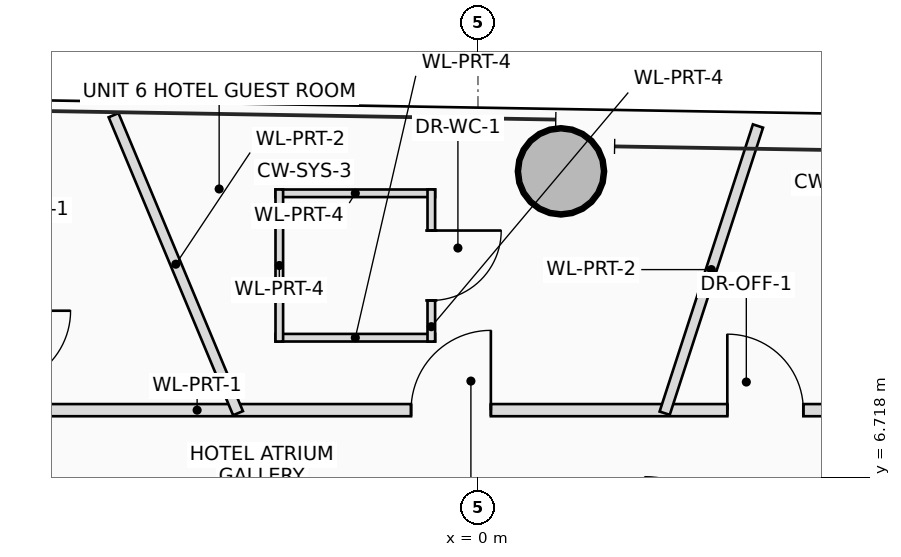
"""IFC4 building model, lengths in metres.
Left out: names, types, materials, properties, quantities, classifications, styles, units other than length and angle.
Written with IfcOpenShell. Run it as: python <this file> out.ifc"""

import sys

from ifc_helpers import new_model, si_unit, direction, frame, frame_2d, origin, origin_2d, place, context, subcontext, project, spatial, rectangle, hollow_circle, extrude, source, transform, mapped, element, fill, save


model = new_model("IFC4")
c1 = context("Model", 3, precision=1e-05, world=origin(), true_north=direction((0.0, 1.0)))
c2 = subcontext(c1, "Body", "Model", "MODEL_VIEW")
j1 = project(units=[si_unit("LENGTHUNIT", "METRE"), si_unit("PLANEANGLEUNIT", "RADIAN")], contexts=[c1])
p1 = place(None, origin())
s1 = spatial("IfcSite", under=j1, at=p1, CompositionType="ELEMENT")
p2 = place(p1, origin())
s2 = spatial("IfcBuilding", under=s1, at=p2, CompositionType="ELEMENT")
p3 = place(p2, frame((0.0, 0.0, 215.6)))
s3 = spatial("IfcBuildingStorey", under=s2, at=p3, CompositionType="ELEMENT", Elevation=215.6)
m1 = source(origin(), c2, "Body", "SweptSolid", [
    extrude(hollow_circle(Radius=0.575, WallThickness=0.042, at=origin_2d()), origin(), (0.0, 0.0, 1.0), 3.45),
])
p4 = place(p3, frame((1.092, 10.742, 0.0), z_axis=(0.0, 0.0, 1.0), x_axis=(1.0, 0.0, 0.0)))
e1 = element("IfcColumn", 1, at=p4, inside=s3, PredefinedType="COLUMN", context=c2, shape_type="MappedRepresentation", body=[
    mapped(m1, transform((0.0, 0.0, 0.0), scale=1.0)),
])
for number, where, z_axis, x_axis in (
    (2, (-2.664, 10.453, 0.0), (0.0, 0.0, 1.0), (1.0, 0.0, 0.0)),
    (3, (-0.564, 8.553, 0.0), (0.0, 0.0, 1.0), (-1.0, 0.0, 0.0)),
):
    element("IfcWall", number, at=place(p3, frame(where, z_axis=z_axis, x_axis=x_axis)), inside=s3, PredefinedType="PARTITIONING", context=c2, shape_type="SweptSolid", body=[
        extrude(rectangle(XDim=2.1, YDim=0.1, at=frame_2d((1.05, 0.0))), origin(), (0.0, 0.0, 1.0), 3.21),
    ])
p5 = place(p3, frame((-0.614, 10.503, 0.0), z_axis=(0.0, 0.0, 1.0), x_axis=(0.0, -1.0, 0.0)))
e4 = element("IfcWall", 4, at=p5, inside=s3, PredefinedType="PARTITIONING", context=c2, shape_type="SweptSolid", body=[
    extrude(rectangle(XDim=2.0, YDim=0.1, at=frame_2d((1.0, 0.0))), origin(), (0.0, 0.0, 1.0), 2.865),
])
p6 = place(p5, frame((0.54, 0.0, 0.0)))
e5 = element("IfcOpeningElement", 5, at=p6, cuts=e4, PredefinedType="OPENING", context=c2, shape_type="SweptSolid", body=[
    extrude(rectangle(XDim=0.92, YDim=2.1, at=frame_2d((0.46, 1.05))), frame((0.0, 0.06, 0.0), z_axis=(0.0, -1.0, 0.0), x_axis=(1.0, 0.0, 0.0)), (0.0, 0.0, 1.0), 0.12),
])
p7 = place(p3, frame((-2.614, 8.503, 0.0), z_axis=(0.0, 0.0, 1.0), x_axis=(0.0, 1.0, 0.0)))
e6 = element("IfcWall", 6, at=p7, inside=s3, PredefinedType="PARTITIONING", context=c2, shape_type="SweptSolid", body=[
    extrude(rectangle(XDim=2.0, YDim=0.1, at=frame_2d((1.0, 0.0))), origin(), (0.0, 0.0, 1.0), 2.865),
])
p8 = place(p3, frame((-6.36, 7.6, 0.0), z_axis=(0.0, 0.0, 1.0), x_axis=(1.0, 0.0, 0.0)))
e7 = element("IfcWall", 7, at=p8, inside=s3, PredefinedType="PARTITIONING", context=c2, shape_type="SweptSolid", body=[
    extrude(rectangle(XDim=11.61, YDim=0.16, at=frame_2d((5.805, 0.0))), origin(), (0.0, 0.0, 1.0), 2.565),
])
p9 = place(p8, frame((5.479, 0.0, 0.0)))
e8 = element("IfcOpeningElement", 8, at=p9, cuts=e7, PredefinedType="OPENING", context=c2, shape_type="SweptSolid", body=[
    extrude(rectangle(XDim=1.05, YDim=2.2, at=frame_2d((0.525, 1.1))), frame((0.0, 0.09, 0.0), z_axis=(0.0, -1.0, 0.0), x_axis=(1.0, 0.0, 0.0)), (0.0, 0.0, 1.0), 0.18),
])
p10 = place(p8, frame((9.641, 0.0, 0.0)))
e9 = element("IfcOpeningElement", 9, at=p10, cuts=e7, PredefinedType="OPENING", context=c2, shape_type="SweptSolid", body=[
    extrude(rectangle(XDim=1.0, YDim=2.25, at=frame_2d((0.5, 1.125))), frame((0.0, 0.09, 0.0), z_axis=(0.0, -1.0, 0.0), x_axis=(1.0, 0.0, 0.0)), (0.0, 0.0, 1.0), 0.18),
])
p11 = place(p3, frame((2.456, 7.56, 0.0), z_axis=(0.0, 0.0, 1.0), x_axis=(0.30904716458, 0.951046712872, 0.0)))
e10 = element("IfcWall", 10, at=p11, inside=s3, PredefinedType="PARTITIONING", context=c2, shape_type="SweptSolid", body=[
    extrude(rectangle(XDim=3.973, YDim=0.14, at=frame_2d((1.986, 0.0))), origin(), (0.0, 0.0, 1.0), 2.565),
])
p12 = place(p3, frame((-3.157, 7.56, 0.0), z_axis=(0.0, 0.0, 1.0), x_axis=(-0.38535788012, 0.922767199368, 0.0)))
e11 = element("IfcWall", 11, at=p12, inside=s3, PredefinedType="PARTITIONING", context=c2, shape_type="SweptSolid", body=[
    extrude(rectangle(XDim=4.249, YDim=0.14, at=frame_2d((2.124, 0.0))), origin(), (0.0, 0.0, 1.0), 2.725),
])
p13 = place(p6, origin())
e12 = element("IfcDoor", 12, at=p13, inside=s3, OperationType="SINGLE_SWING_LEFT", PredefinedType="DOOR", context=c2, shape_type="SweptSolid", body=[
    extrude(rectangle(XDim=0.92, YDim=2.1, at=frame_2d((0.46, 1.05))), frame((0.0, 0.025, 0.0), z_axis=(0.0, -1.0, 0.0), x_axis=(1.0, 0.0, 0.0)), (0.0, 0.0, 1.0), 0.05),
])
fill(e5, e12)
p14 = place(p9, origin())
e13 = element("IfcDoor", 13, at=p14, inside=s3, OperationType="SINGLE_SWING_RIGHT", PredefinedType="DOOR", context=c2, shape_type="SweptSolid", body=[
    extrude(rectangle(XDim=1.05, YDim=2.2, at=frame_2d((0.525, 1.1))), frame((0.0, 0.025, 0.0), z_axis=(0.0, -1.0, 0.0), x_axis=(1.0, 0.0, 0.0)), (0.0, 0.0, 1.0), 0.05),
])
fill(e8, e13)
p15 = place(p10, origin())
e14 = element("IfcDoor", 14, at=p15, inside=s3, OperationType="SINGLE_SWING_LEFT", PredefinedType="DOOR", context=c2, shape_type="SweptSolid", body=[
    extrude(rectangle(XDim=1.0, YDim=2.25, at=frame_2d((0.5, 1.125))), frame((0.0, 0.025, 0.0), z_axis=(0.0, -1.0, 0.0), x_axis=(1.0, 0.0, 0.0)), (0.0, 0.0, 1.0), 0.05),
])
fill(e9, e14)
save(model, sys.argv[1])
